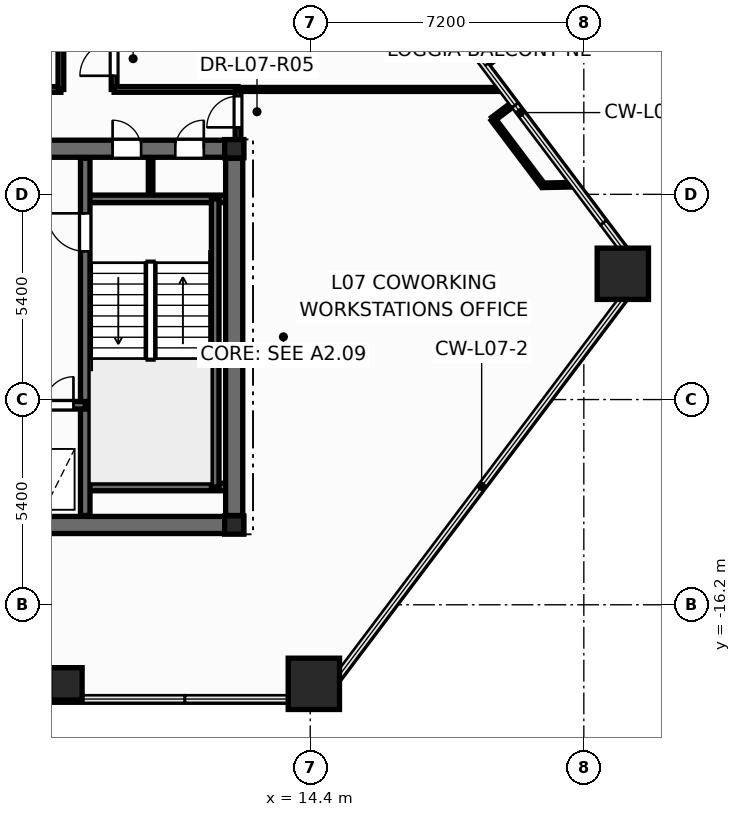
"""IFC4 building model, lengths in metres.
Left out: names, types, materials, properties, quantities, classifications, styles, units other than length and angle.
Written with IfcOpenShell. Run it as: python <this file> out.ifc"""

import sys

from ifc_helpers import new_model, si_unit, direction, frame, frame_2d, origin, origin_2d, place, context, subcontext, project, spatial, rectangle, hollow_rectangle, hollow_circle, i_section, extrude, element, fill, save


model = new_model("IFC4")
c1 = context("Model", 3, precision=1e-05, world=origin(), true_north=direction((0.0, 1.0)))
c2 = subcontext(c1, "Body", "Model", "MODEL_VIEW")
j1 = project(units=[si_unit("LENGTHUNIT", "METRE"), si_unit("PLANEANGLEUNIT", "RADIAN")], contexts=[c1])
p1 = place(None, origin())
s1 = spatial("IfcSite", under=j1, at=p1, CompositionType="ELEMENT")
p2 = place(p1, origin())
s2 = spatial("IfcBuilding", under=s1, at=p2, CompositionType="ELEMENT")
p3 = place(p2, frame((0.0, 0.0, 31.5)))
s3 = spatial("IfcBuildingStorey", under=s2, at=p3, CompositionType="ELEMENT", Elevation=31.5)
for number, where, z_axis, x_axis in (
    (1, (14.496, -18.28, 0.0), (0.0, 0.0, 1.0), (1.0, 0.0, 0.0)),
    (2, (22.626, -7.49, 0.0), (0.0, 0.0, 1.0), (1.0, 0.0, 0.0)),
):
    element("IfcColumn", number, at=place(p3, frame(where, z_axis=z_axis, x_axis=x_axis)), inside=s3, PredefinedType="COLUMN", context=c2, shape_type="SweptSolid", body=[
        extrude(hollow_rectangle(XDim=1.35, YDim=1.35, WallThickness=0.065, at=origin_2d()), origin(), (0.0, 0.0, 1.0), 3.6),
    ])
p4 = place(p3, frame((7.973, -18.28, 0.0), z_axis=(0.0, 0.0, 1.0), x_axis=(1.0, 0.0, 0.0)))
e3 = element("IfcColumn", 3, at=p4, inside=s3, PredefinedType="COLUMN", context=c2, shape_type="SweptSolid", body=[
    extrude(hollow_circle(Radius=0.425, WallThickness=0.038, at=origin_2d()), origin(), (0.0, 0.0, 1.0), 3.6),
])
for number, where, z_axis, x_axis in (
    (4, (12.4, -14.1, 0.0), (0.0, 0.0, 1.0), (1.0, 0.0, 0.0)),
    (5, (12.4, -4.2, 0.0), (0.0, 0.0, 1.0), (1.0, 0.0, 0.0)),
):
    element("IfcColumn", number, at=place(p3, frame(where, z_axis=z_axis, x_axis=x_axis)), inside=s3, PredefinedType="COLUMN", context=c2, shape_type="SweptSolid", body=[
        extrude(i_section(OverallWidth=0.5, OverallDepth=0.482, WebThickness=0.04, FlangeThickness=0.045, at=origin_2d()), origin(), (0.0, 0.0, 1.0), 3.6),
    ])
p5 = place(p3, frame((10.2, -5.52, 0.0), z_axis=(0.0, 0.0, 1.0), x_axis=(0.0, 1.0, 0.0)))
e6 = element("IfcWall", 6, at=p5, inside=s3, PredefinedType="PARTITIONING", context=c2, shape_type="SweptSolid", body=[
    extrude(rectangle(XDim=1.12, YDim=0.12, at=frame_2d((0.56, 0.0))), origin(), (0.0, 0.0, 1.0), 3.35),
])
p6 = place(p3, frame((-12.65, -14.1, 0.0), z_axis=(0.0, 0.0, 1.0), x_axis=(1.0, 0.0, 0.0)))
e7 = element("IfcWall", 7, at=p6, inside=s3, PredefinedType="SHEAR", context=c2, shape_type="SweptSolid", body=[
    extrude(rectangle(XDim=25.3, YDim=0.45, at=frame_2d((12.65, 0.0))), origin(), (0.0, 0.0, 1.0), 3.6),
])
p7 = place(p3, frame((-12.65, -4.2, 0.0), z_axis=(0.0, 0.0, 1.0), x_axis=(1.0, 0.0, 0.0)))
e8 = element("IfcWall", 8, at=p7, inside=s3, PredefinedType="SHEAR", context=c2, shape_type="SweptSolid", body=[
    extrude(rectangle(XDim=25.3, YDim=0.45, at=frame_2d((12.65, 0.0))), origin(), (0.0, 0.0, 1.0), 3.6),
])
p8 = place(p7, frame((1.85, 0.0, 0.0)))
e9 = element("IfcOpeningElement", 9, at=p8, cuts=e8, PredefinedType="OPENING", context=c2, shape_type="SweptSolid", body=[
    extrude(rectangle(XDim=0.756, YDim=2.054, at=frame_2d((0.375, 1.027))), frame((0.0, 0.235, 0.0), z_axis=(0.0, -1.0, 0.0), x_axis=(1.0, 0.0, 0.0)), (0.0, 0.0, 1.0), 0.47),
])
p9 = place(p7, frame((21.85, 0.0, 0.0)))
e10 = element("IfcOpeningElement", 10, at=p9, cuts=e8, PredefinedType="OPENING", context=c2, shape_type="SweptSolid", body=[
    extrude(rectangle(XDim=0.756, YDim=2.054, at=frame_2d((0.375, 1.027))), frame((0.0, 0.235, 0.0), z_axis=(0.0, -1.0, 0.0), x_axis=(1.0, 0.0, 0.0)), (0.0, 0.0, 1.0), 0.47),
])
p10 = place(p7, frame((23.5, 0.0, 0.0)))
e11 = element("IfcOpeningElement", 11, at=p10, cuts=e8, PredefinedType="OPENING", context=c2, shape_type="SweptSolid", body=[
    extrude(rectangle(XDim=0.756, YDim=2.054, at=frame_2d((0.375, 1.027))), frame((0.0, 0.235, 0.0), z_axis=(0.0, -1.0, 0.0), x_axis=(1.0, 0.0, 0.0)), (0.0, 0.0, 1.0), 0.47),
])
p11 = place(p7, frame((5.85, 0.0, 0.0)))
e12 = element("IfcOpeningElement", 12, at=p11, cuts=e8, PredefinedType="OPENING", context=c2, shape_type="SweptSolid", body=[
    extrude(rectangle(XDim=1.006, YDim=2.104, at=frame_2d((0.5, 1.052))), frame((0.0, 0.235, 0.0), z_axis=(0.0, -1.0, 0.0), x_axis=(1.0, 0.0, 0.0)), (0.0, 0.0, 1.0), 0.47),
])
p12 = place(p7, frame((10.35, 0.0, 0.0)))
e13 = element("IfcOpeningElement", 13, at=p12, cuts=e8, PredefinedType="OPENING", context=c2, shape_type="SweptSolid", body=[
    extrude(rectangle(XDim=1.406, YDim=2.154, at=frame_2d((0.7, 1.077))), frame((0.0, 0.235, 0.0), z_axis=(0.0, -1.0, 0.0), x_axis=(1.0, 0.0, 0.0)), (0.0, 0.0, 1.0), 0.47),
])
p13 = place(p7, frame((18.45, 0.0, 0.0)))
e14 = element("IfcOpeningElement", 14, at=p13, cuts=e8, PredefinedType="OPENING", context=c2, shape_type="SweptSolid", body=[
    extrude(rectangle(XDim=1.006, YDim=2.104, at=frame_2d((0.5, 1.052))), frame((0.0, 0.235, 0.0), z_axis=(0.0, -1.0, 0.0), x_axis=(1.0, 0.0, 0.0)), (0.0, 0.0, 1.0), 0.47),
])
for number, where, z_axis, x_axis in (
    (15, (8.48, -5.52, 0.0), (0.0, 0.0, 1.0), (1.0, 0.0, 0.0)),
    (16, (8.48, -13.1, 0.0), (0.0, 0.0, 1.0), (1.0, 0.0, 0.0)),
):
    element("IfcWall", number, at=place(p3, frame(where, z_axis=z_axis, x_axis=x_axis)), inside=s3, PredefinedType="SOLIDWALL", context=c2, shape_type="SweptSolid", body=[
        extrude(rectangle(XDim=3.87, YDim=0.2, at=frame_2d((1.935, 0.0))), origin(), (0.0, 0.0, 1.0), 3.6),
    ])
p14 = place(p3, frame((11.9, -13.1, 0.0), z_axis=(0.0, 0.0, 1.0), x_axis=(0.0, 1.0, 0.0)))
e17 = element("IfcWall", 17, at=p14, inside=s3, PredefinedType="SOLIDWALL", context=c2, shape_type="SweptSolid", body=[
    extrude(rectangle(XDim=7.58, YDim=0.2, at=frame_2d((3.79, 0.0))), origin(), (0.0, 0.0, 1.0), 3.6),
])
p15 = place(p3, frame((8.48, -13.85, 0.0), z_axis=(0.0, 0.0, 1.0), x_axis=(0.0, 1.0, 0.0)))
e18 = element("IfcWall", 18, at=p15, inside=s3, PredefinedType="SHEAR", context=c2, shape_type="SweptSolid", body=[
    extrude(rectangle(XDim=9.4, YDim=0.25, at=frame_2d((4.7, 0.0))), origin(), (0.0, 0.0, 1.0), 3.6),
])
p16 = place(p15, frame((6.95, 0.0, 0.0)))
e19 = element("IfcOpeningElement", 19, at=p16, cuts=e18, PredefinedType="OPENING", context=c2, shape_type="SweptSolid", body=[
    extrude(rectangle(XDim=1.006, YDim=2.104, at=frame_2d((0.5, 1.052))), frame((0.0, 0.135, 0.0), z_axis=(0.0, -1.0, 0.0), x_axis=(1.0, 0.0, 0.0)), (0.0, 0.0, 1.0), 0.27),
])
p17 = place(p3, frame((5.12, -10.95, 0.0), z_axis=(0.0, 0.0, 1.0), x_axis=(1.0, 0.0, 0.0)))
e20 = element("IfcWall", 20, at=p17, inside=s3, PredefinedType="SOLIDWALL", context=c2, shape_type="SweptSolid", body=[
    extrude(rectangle(XDim=3.36, YDim=0.2, at=frame_2d((1.68, 0.0))), origin(), (0.0, 0.0, 1.0), 3.6),
])
p18 = place(p17, frame((0.42, 0.0, 0.0)))
e21 = element("IfcOpeningElement", 21, at=p18, cuts=e20, PredefinedType="OPENING", context=c2, shape_type="SweptSolid", body=[
    extrude(rectangle(XDim=1.106, YDim=2.104, at=frame_2d((0.55, 1.052))), frame((0.0, 0.11, 0.0), z_axis=(0.0, -1.0, 0.0), x_axis=(1.0, 0.0, 0.0)), (0.0, 0.0, 1.0), 0.22),
])
p19 = place(p17, frame((2.3, 0.0, 0.0)))
e22 = element("IfcOpeningElement", 22, at=p19, cuts=e20, PredefinedType="OPENING", context=c2, shape_type="SweptSolid", body=[
    extrude(rectangle(XDim=0.756, YDim=2.054, at=frame_2d((0.375, 1.027))), frame((0.0, 0.11, 0.0), z_axis=(0.0, -1.0, 0.0), x_axis=(1.0, 0.0, 0.0)), (0.0, 0.0, 1.0), 0.22),
])
p20 = place(p3, frame((12.4, -13.85, 0.0), z_axis=(0.0, 0.0, 1.0), x_axis=(0.0, 1.0, 0.0)))
e23 = element("IfcWall", 23, at=p20, inside=s3, PredefinedType="SHEAR", context=c2, shape_type="SweptSolid", body=[
    extrude(rectangle(XDim=9.4, YDim=0.45, at=frame_2d((4.7, 0.0))), origin(), (0.0, 0.0, 1.0), 3.6),
])
p21 = place(p3, frame((9.24, -2.64, 0.0), z_axis=(0.0, 0.0, 1.0), x_axis=(0.0, 1.0, 0.0)))
e24 = element("IfcWall", 24, at=p21, inside=s3, PredefinedType="PARTITIONING", context=c2, shape_type="SweptSolid", body=[
    extrude(rectangle(XDim=8.84, YDim=0.15, at=frame_2d((4.42, 0.0))), origin(), (0.0, 0.0, 1.0), 2.509),
])
p22 = place(p21, frame((0.359, 0.0, 0.0)))
e25 = element("IfcOpeningElement", 25, at=p22, cuts=e24, PredefinedType="OPENING", context=c2, shape_type="SweptSolid", body=[
    extrude(rectangle(XDim=0.906, YDim=2.104, at=frame_2d((0.45, 1.052))), frame((0.0, 0.085, 0.0), z_axis=(0.0, -1.0, 0.0), x_axis=(1.0, 0.0, 0.0)), (0.0, 0.0, 1.0), 0.17),
])
p23 = place(p3, frame((0.74, -2.64, 0.0), z_axis=(0.0, 0.0, 1.0), x_axis=(1.0, 0.0, 0.0)))
e26 = element("IfcWall", 26, at=p23, inside=s3, PredefinedType="PARTITIONING", context=c2, shape_type="SweptSolid", body=[
    extrude(rectangle(XDim=7.1, YDim=0.15, at=frame_2d((3.55, 0.0))), origin(), (0.0, 0.0, 1.0), 2.325),
])
p24 = place(p23, frame((0.72, 0.0, 0.0)))
e27 = element("IfcOpeningElement", 27, at=p24, cuts=e26, PredefinedType="OPENING", context=c2, shape_type="SweptSolid", body=[
    extrude(rectangle(XDim=0.906, YDim=2.104, at=frame_2d((0.45, 1.052))), frame((0.0, 0.085, 0.0), z_axis=(0.0, -1.0, 0.0), x_axis=(1.0, 0.0, 0.0)), (0.0, 0.0, 1.0), 0.17),
])
p25 = place(p3, frame((12.5, -2.64, 0.0), z_axis=(0.0, 0.0, 1.0), x_axis=(1.0, 0.0, 0.0)))
e28 = element("IfcWall", 28, at=p25, inside=s3, PredefinedType="PARTITIONING", context=c2, shape_type="SweptSolid", body=[
    extrude(rectangle(XDim=6.972, YDim=0.105, at=frame_2d((3.486, 0.0))), origin(), (0.0, 0.0, 1.0), 2.713),
])
p26 = place(p3, frame((7.84, -2.64, 0.0), z_axis=(0.0, 0.0, 1.0), x_axis=(0.0, 1.0, 0.0)))
e29 = element("IfcWall", 29, at=p26, inside=s3, PredefinedType="PARTITIONING", context=c2, shape_type="SweptSolid", body=[
    extrude(rectangle(XDim=8.84, YDim=0.15, at=frame_2d((4.42, 0.0))), origin(), (0.0, 0.0, 1.0), 2.509),
])
p27 = place(p3, frame((9.24, -2.64, 0.0), z_axis=(0.0, 0.0, 1.0), x_axis=(1.0, 0.0, 0.0)))
e30 = element("IfcWall", 30, at=p27, inside=s3, PredefinedType="PARTITIONING", context=c2, shape_type="SweptSolid", body=[
    extrude(rectangle(XDim=3.26, YDim=0.15, at=frame_2d((1.63, 0.0))), origin(), (0.0, 0.0, 1.0), 3.35),
])
p28 = place(p3, frame((20.522, -5.163, 0.0), z_axis=(0.0, 0.0, 1.0), x_axis=(-0.601826426809, 0.798626916648, 0.0)))
e31 = element("IfcWall", 31, at=p28, inside=s3, PredefinedType="PARTITIONING", context=c2, shape_type="SweptSolid", body=[
    extrude(rectangle(XDim=2.18, YDim=0.12, at=frame_2d((1.09, 0.0))), origin(), (0.0, 0.0, 1.0), 3.35),
])
p29 = place(p3, frame((12.5, -4.24, 0.0), z_axis=(0.0, 0.0, 1.0), x_axis=(0.0, 1.0, 0.0)))
e32 = element("IfcWall", 32, at=p29, inside=s3, PredefinedType="PARTITIONING", context=c2, shape_type="SweptSolid", body=[
    extrude(rectangle(XDim=1.6, YDim=0.15, at=frame_2d((0.8, 0.0))), origin(), (0.0, 0.0, 1.0), 2.325),
])
p30 = place(p29, frame((0.602, 0.0, 0.0)))
e33 = element("IfcOpeningElement", 33, at=p30, cuts=e32, PredefinedType="OPENING", context=c2, shape_type="SweptSolid", body=[
    extrude(rectangle(XDim=0.826, YDim=2.104, at=frame_2d((0.41, 1.052))), frame((0.0, 0.085, 0.0), z_axis=(0.0, -1.0, 0.0), x_axis=(1.0, 0.0, 0.0)), (0.0, 0.0, 1.0), 0.17),
])
p31 = place(p3, frame((21.348, -5.146, 0.0), z_axis=(0.0, 0.0, 1.0), x_axis=(-0.999785995621, -0.02068726565, 0.0)))
e34 = element("IfcWall", 34, at=p31, inside=s3, PredefinedType="PARTITIONING", context=c2, shape_type="SweptSolid", body=[
    extrude(rectangle(XDim=0.826, YDim=0.12, at=frame_2d((0.413, 0.0))), origin(), (0.0, 0.0, 1.0), 2.713),
])
p32 = place(p3, frame((19.21, -3.422, 0.0), z_axis=(0.0, 0.0, 1.0), x_axis=(0.798598820081, 0.601863709294, 0.0)))
e35 = element("IfcWall", 35, at=p32, inside=s3, PredefinedType="PARTITIONING", context=c2, shape_type="SweptSolid", body=[
    extrude(rectangle(XDim=0.67, YDim=0.12, at=frame_2d((0.335, 0.0))), origin(), (0.0, 0.0, 1.0), 2.713),
])
p33 = place(p16, origin())
e36 = element("IfcDoor", 36, at=p33, inside=s3, OperationType="SINGLE_SWING_RIGHT", PredefinedType="DOOR", context=c2, shape_type="SweptSolid", body=[
    extrude(rectangle(XDim=1.0, YDim=2.1, at=frame_2d((0.5, 1.05))), frame((0.0, 0.025, 0.0), z_axis=(0.0, -1.0, 0.0), x_axis=(1.0, 0.0, 0.0)), (0.0, 0.0, 1.0), 0.05),
])
fill(e19, e36)
p34 = place(p19, origin())
e37 = element("IfcDoor", 37, at=p34, inside=s3, OperationType="SINGLE_SWING_RIGHT", PredefinedType="DOOR", context=c2, shape_type="SweptSolid", body=[
    extrude(rectangle(XDim=0.75, YDim=2.05, at=frame_2d((0.375, 1.025))), frame((0.0, 0.025, 0.0), z_axis=(0.0, -1.0, 0.0), x_axis=(1.0, 0.0, 0.0)), (0.0, 0.0, 1.0), 0.05),
])
fill(e22, e37)
p35 = place(p9, origin())
e38 = element("IfcDoor", 38, at=p35, inside=s3, OperationType="SINGLE_SWING_LEFT", PredefinedType="DOOR", context=c2, shape_type="SweptSolid", body=[
    extrude(rectangle(XDim=0.75, YDim=2.05, at=frame_2d((0.375, 1.025))), frame((0.0, 0.025, 0.0), z_axis=(0.0, -1.0, 0.0), x_axis=(1.0, 0.0, 0.0)), (0.0, 0.0, 1.0), 0.05),
])
fill(e10, e38)
p36 = place(p10, origin())
e39 = element("IfcDoor", 39, at=p36, inside=s3, OperationType="SINGLE_SWING_RIGHT", PredefinedType="DOOR", context=c2, shape_type="SweptSolid", body=[
    extrude(rectangle(XDim=0.75, YDim=2.05, at=frame_2d((0.375, 1.025))), frame((0.0, 0.025, 0.0), z_axis=(0.0, -1.0, 0.0), x_axis=(1.0, 0.0, 0.0)), (0.0, 0.0, 1.0), 0.05),
])
fill(e11, e39)
p37 = place(p30, origin())
e40 = element("IfcDoor", 40, at=p37, inside=s3, OperationType="SINGLE_SWING_LEFT", PredefinedType="DOOR", context=c2, shape_type="SweptSolid", body=[
    extrude(rectangle(XDim=0.82, YDim=2.1, at=frame_2d((0.41, 1.05))), frame((0.0, 0.025, 0.0), z_axis=(0.0, -1.0, 0.0), x_axis=(1.0, 0.0, 0.0)), (0.0, 0.0, 1.0), 0.05),
])
fill(e33, e40)
p38 = place(p22, origin())
e41 = element("IfcDoor", 41, at=p38, inside=s3, OperationType="SINGLE_SWING_LEFT", PredefinedType="DOOR", context=c2, shape_type="SweptSolid", body=[
    extrude(rectangle(XDim=0.9, YDim=2.1, at=frame_2d((0.45, 1.05))), frame((0.0, 0.025, 0.0), z_axis=(0.0, -1.0, 0.0), x_axis=(1.0, 0.0, 0.0)), (0.0, 0.0, 1.0), 0.05),
])
fill(e25, e41)
save(model, sys.argv[1])
